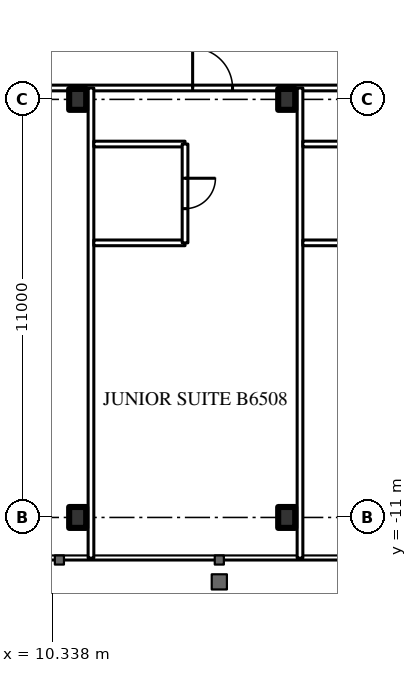
"""IFC4 building model, lengths in metres.
Left out: names, types, materials, properties, quantities, classifications, styles, units other than length and angle.
Written with IfcOpenShell. Run it as: python <this file> out.ifc"""

import sys

from ifc_helpers import new_model, si_unit, direction, frame, frame_2d, origin, origin_2d, place, context, subcontext, project, spatial, rectangle, i_section, extrude, element, fill, save


model = new_model("IFC4")
c1 = context("Model", 3, precision=1e-05, world=origin(), true_north=direction((0.0, 1.0)))
c2 = subcontext(c1, "Body", "Model", "MODEL_VIEW")
j1 = project(units=[si_unit("LENGTHUNIT", "METRE"), si_unit("PLANEANGLEUNIT", "RADIAN")], contexts=[c1])
p1 = place(None, origin())
s1 = spatial("IfcSite", under=j1, at=p1, CompositionType="ELEMENT")
p2 = place(p1, origin())
s2 = spatial("IfcBuilding", under=s1, at=p2, CompositionType="ELEMENT")
p3 = place(p2, frame((0.0, 0.0, 244.1)))
s3 = spatial("IfcBuildingStorey", under=s2, at=p3, CompositionType="ELEMENT", Elevation=244.1)
for number, where, z_axis, x_axis in (
    (1, (11.0, -11.0, 0.0), (0.0, 0.0, 1.0), (1.0, 0.0, 0.0)),
    (2, (16.5, -11.0, 0.0), (0.0, 0.0, 1.0), (1.0, 0.0, 0.0)),
    (3, (11.0, 0.0, 0.0), (0.0, 0.0, 1.0), (1.0, 0.0, 0.0)),
    (4, (16.5, 0.0, 0.0), (0.0, 0.0, 1.0), (1.0, 0.0, 0.0)),
):
    element("IfcColumn", number, at=place(p3, frame(where, z_axis=z_axis, x_axis=x_axis)), inside=s3, PredefinedType="COLUMN", context=c2, shape_type="SweptSolid", body=[
        extrude(i_section(OverallWidth=0.448, OverallDepth=0.55, WebThickness=0.072, FlangeThickness=0.115, FilletRadius=0.02, at=origin_2d()), origin(), (0.0, 0.0, 1.0), 3.6),
    ])
p4 = place(p3, frame((-27.5, 0.3, 0.0), z_axis=(0.0, 0.0, 1.0), x_axis=(1.0, 0.0, 0.0)))
e5 = element("IfcWall", 5, at=p4, inside=s3, PredefinedType="PARTITIONING", context=c2, shape_type="SweptSolid", body=[
    extrude(rectangle(XDim=55.0, YDim=0.15, at=frame_2d((27.5, 0.0))), origin(), (0.0, 0.0, 1.0), 2.4),
])
p5 = place(p4, frame((1.575, 0.0, 0.0)))
e6 = element("IfcOpeningElement", 6, at=p5, cuts=e5, PredefinedType="OPENING", context=c2, shape_type="SweptSolid", body=[
    extrude(rectangle(XDim=1.0, YDim=2.2, at=frame_2d((0.5, 1.1))), frame((0.0, 0.085, 0.0), z_axis=(0.0, -1.0, 0.0), x_axis=(1.0, 0.0, 0.0)), (0.0, 0.0, 1.0), 0.17),
])
p6 = place(p4, frame((8.525, 0.0, 0.0)))
e7 = element("IfcOpeningElement", 7, at=p6, cuts=e5, PredefinedType="OPENING", context=c2, shape_type="SweptSolid", body=[
    extrude(rectangle(XDim=1.05, YDim=2.4, at=frame_2d((0.525, 1.2))), frame((0.0, 0.085, 0.0), z_axis=(0.0, -1.0, 0.0), x_axis=(1.0, 0.0, 0.0)), (0.0, 0.0, 1.0), 0.17),
])
p7 = place(p4, frame((14.025, 0.0, 0.0)))
e8 = element("IfcOpeningElement", 8, at=p7, cuts=e5, PredefinedType="OPENING", context=c2, shape_type="SweptSolid", body=[
    extrude(rectangle(XDim=1.05, YDim=2.4, at=frame_2d((0.525, 1.2))), frame((0.0, 0.085, 0.0), z_axis=(0.0, -1.0, 0.0), x_axis=(1.0, 0.0, 0.0)), (0.0, 0.0, 1.0), 0.17),
])
p8 = place(p4, frame((25.025, 0.0, 0.0)))
e9 = element("IfcOpeningElement", 9, at=p8, cuts=e5, PredefinedType="OPENING", context=c2, shape_type="SweptSolid", body=[
    extrude(rectangle(XDim=1.05, YDim=2.4, at=frame_2d((0.525, 1.2))), frame((0.0, 0.085, 0.0), z_axis=(0.0, -1.0, 0.0), x_axis=(1.0, 0.0, 0.0)), (0.0, 0.0, 1.0), 0.17),
])
p9 = place(p4, frame((30.525, 0.0, 0.0)))
e10 = element("IfcOpeningElement", 10, at=p9, cuts=e5, PredefinedType="OPENING", context=c2, shape_type="SweptSolid", body=[
    extrude(rectangle(XDim=1.05, YDim=2.4, at=frame_2d((0.525, 1.2))), frame((0.0, 0.085, 0.0), z_axis=(0.0, -1.0, 0.0), x_axis=(1.0, 0.0, 0.0)), (0.0, 0.0, 1.0), 0.17),
])
p10 = place(p4, frame((41.525, 0.0, 0.0)))
e11 = element("IfcOpeningElement", 11, at=p10, cuts=e5, PredefinedType="OPENING", context=c2, shape_type="SweptSolid", body=[
    extrude(rectangle(XDim=1.05, YDim=2.4, at=frame_2d((0.525, 1.2))), frame((0.0, 0.085, 0.0), z_axis=(0.0, -1.0, 0.0), x_axis=(1.0, 0.0, 0.0)), (0.0, 0.0, 1.0), 0.17),
])
p11 = place(p4, frame((47.025, 0.0, 0.0)))
e12 = element("IfcOpeningElement", 12, at=p11, cuts=e5, PredefinedType="OPENING", context=c2, shape_type="SweptSolid", body=[
    extrude(rectangle(XDim=1.05, YDim=2.4, at=frame_2d((0.525, 1.2))), frame((0.0, 0.085, 0.0), z_axis=(0.0, -1.0, 0.0), x_axis=(1.0, 0.0, 0.0)), (0.0, 0.0, 1.0), 0.17),
])
p12 = place(p4, frame((52.525, 0.0, 0.0)))
e13 = element("IfcOpeningElement", 13, at=p12, cuts=e5, PredefinedType="OPENING", context=c2, shape_type="SweptSolid", body=[
    extrude(rectangle(XDim=1.05, YDim=2.4, at=frame_2d((0.525, 1.2))), frame((0.0, 0.085, 0.0), z_axis=(0.0, -1.0, 0.0), x_axis=(1.0, 0.0, 0.0)), (0.0, 0.0, 1.0), 0.17),
])
for number, where, z_axis, x_axis in (
    (14, (11.35, -12.07, 0.0), (0.0, 0.0, 1.0), (0.0, 1.0, 0.0)),
    (15, (16.85, -12.07, 0.0), (0.0, 0.0, 1.0), (0.0, 1.0, 0.0)),
):
    element("IfcWall", number, at=place(p3, frame(where, z_axis=z_axis, x_axis=x_axis)), inside=s3, PredefinedType="PARTITIONING", context=c2, shape_type="SweptSolid", body=[
        extrude(rectangle(XDim=12.37, YDim=0.15, at=frame_2d((6.185, 0.0))), origin(), (0.0, 0.0, 1.0), 3.4),
    ])
for number, where, z_axis, x_axis in (
    (16, (11.425, -3.775, 0.0), (0.0, 0.0, 1.0), (1.0, 0.0, 0.0)),
    (17, (11.425, -1.175, 0.0), (0.0, 0.0, 1.0), (1.0, 0.0, 0.0)),
):
    element("IfcWall", number, at=place(p3, frame(where, z_axis=z_axis, x_axis=x_axis)), inside=s3, PredefinedType="PARTITIONING", context=c2, shape_type="SweptSolid", body=[
        extrude(rectangle(XDim=2.4, YDim=0.15, at=frame_2d((1.2, 0.0))), origin(), (0.0, 0.0, 1.0), 3.4),
    ])
p13 = place(p3, frame((13.825, -3.775, 0.0), z_axis=(0.0, 0.0, 1.0), x_axis=(0.0, 1.0, 0.0)))
e18 = element("IfcWall", 18, at=p13, inside=s3, PredefinedType="PARTITIONING", context=c2, shape_type="SweptSolid", body=[
    extrude(rectangle(XDim=2.6, YDim=0.15, at=frame_2d((1.3, 0.0))), origin(), (0.0, 0.0, 1.0), 3.4),
])
p14 = place(p13, frame((0.9, 0.0, 0.0)))
e19 = element("IfcOpeningElement", 19, at=p14, cuts=e18, PredefinedType="OPENING", context=c2, shape_type="SweptSolid", body=[
    extrude(rectangle(XDim=0.8, YDim=2.2, at=frame_2d((0.4, 1.1))), frame((0.0, 0.085, 0.0), z_axis=(0.0, -1.0, 0.0), x_axis=(1.0, 0.0, 0.0)), (0.0, 0.0, 1.0), 0.17),
])
for number, where, z_axis, x_axis in (
    (20, (16.925, -3.775, 0.0), (0.0, 0.0, 1.0), (1.0, 0.0, 0.0)),
    (21, (16.925, -1.175, 0.0), (0.0, 0.0, 1.0), (1.0, 0.0, 0.0)),
):
    element("IfcWall", number, at=place(p3, frame(where, z_axis=z_axis, x_axis=x_axis)), inside=s3, PredefinedType="PARTITIONING", context=c2, shape_type="SweptSolid", body=[
        extrude(rectangle(XDim=2.4, YDim=0.15, at=frame_2d((1.2, 0.0))), origin(), (0.0, 0.0, 1.0), 3.4),
    ])
p15 = place(p14, origin())
e22 = element("IfcDoor", 22, at=p15, inside=s3, OperationType="SINGLE_SWING_RIGHT", PredefinedType="DOOR", context=c2, shape_type="SweptSolid", body=[
    extrude(rectangle(XDim=0.8, YDim=2.2, at=frame_2d((0.4, 1.1))), frame((0.0, 0.025, 0.0), z_axis=(0.0, -1.0, 0.0), x_axis=(1.0, 0.0, 0.0)), (0.0, 0.0, 1.0), 0.05),
])
fill(e19, e22)
p16 = place(p10, origin())
e23 = element("IfcDoor", 23, at=p16, inside=s3, OperationType="SINGLE_SWING_LEFT", PredefinedType="DOOR", context=c2, shape_type="SweptSolid", body=[
    extrude(rectangle(XDim=1.05, YDim=2.4, at=frame_2d((0.525, 1.2))), frame((0.0, 0.025, 0.0), z_axis=(0.0, -1.0, 0.0), x_axis=(1.0, 0.0, 0.0)), (0.0, 0.0, 1.0), 0.05),
])
fill(e11, e23)
save(model, sys.argv[1])
